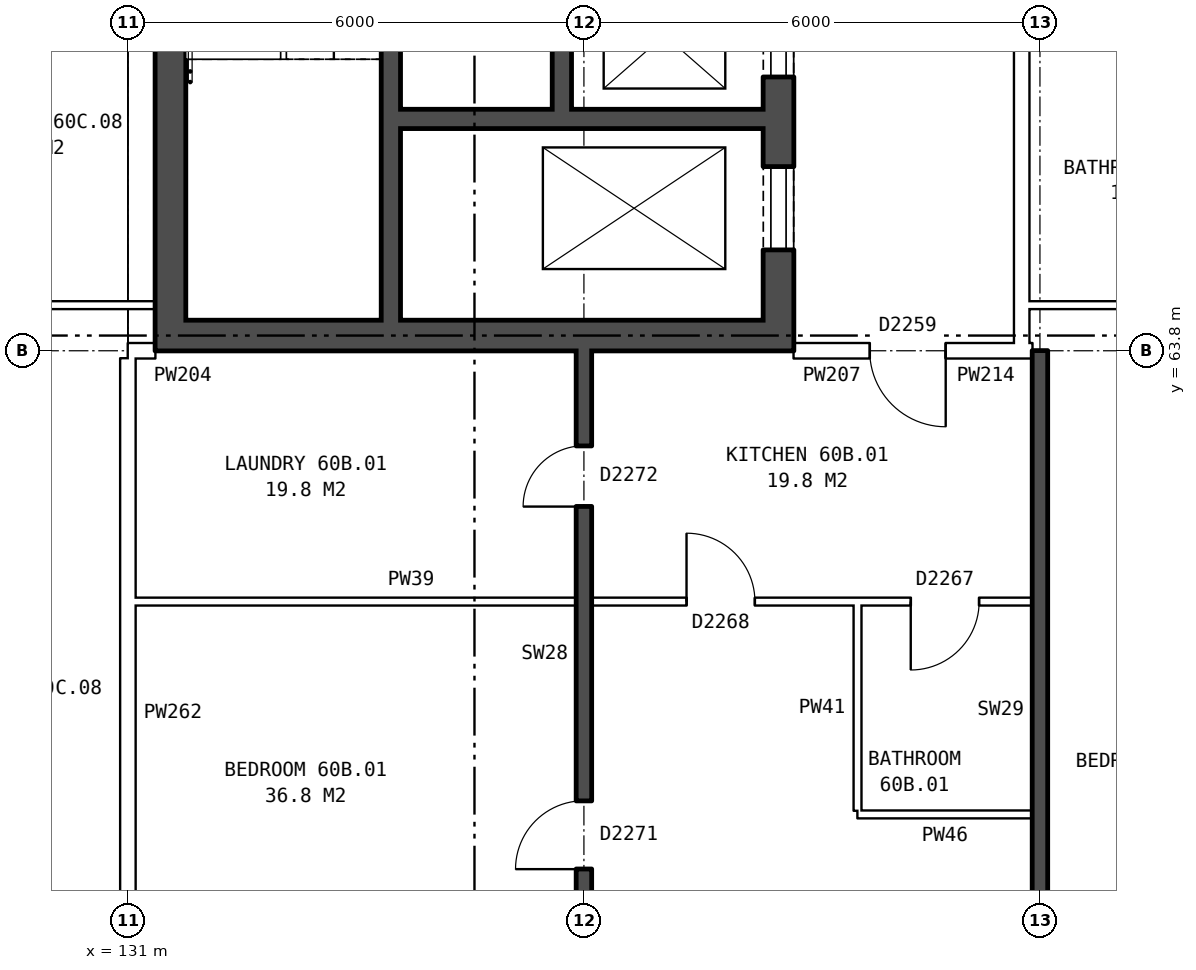
"""IFC4 building model, lengths in metres.
Left out: names, types, materials, properties, quantities, classifications, styles, units other than length and angle.
Written with IfcOpenShell. Run it as: python <this file> out.ifc"""

import sys

from ifc_helpers import new_model, si_unit, direction, frame, frame_2d, origin, place, context, subcontext, project, spatial, rectangle, extrude, element, fill, save


model = new_model("IFC4")
c1 = context("Model", 3, precision=1e-05, world=origin(), true_north=direction((0.0, 1.0)))
c2 = subcontext(c1, "Body", "Model", "MODEL_VIEW")
j1 = project(units=[si_unit("LENGTHUNIT", "METRE"), si_unit("PLANEANGLEUNIT", "RADIAN")], contexts=[c1])
p1 = place(None, origin())
s1 = spatial("IfcSite", under=j1, at=p1, CompositionType="ELEMENT")
p2 = place(p1, origin())
s2 = spatial("IfcBuilding", under=s1, at=p2, CompositionType="ELEMENT")
p3 = place(p2, frame((0.0, 0.0, 212.1)))
s3 = spatial("IfcBuildingStorey", under=s2, at=p3, CompositionType="ELEMENT", Elevation=212.1)
p4 = place(p3, frame((139.56, 63.8, 0.0), z_axis=(0.0, 0.0, 1.0), x_axis=(0.0, 1.0, 0.0)))
e1 = element("IfcWall", 1, at=p4, inside=s3, PredefinedType="SHEAR", context=c2, shape_type="SweptSolid", body=[
    extrude(rectangle(XDim=12.4, YDim=0.4, at=frame_2d((6.2, 0.0))), origin(), (0.0, 0.0, 1.0), 2.85),
])
p5 = place(p4, frame((1.325, 0.0, 0.0)))
e2 = element("IfcOpeningElement", 2, at=p5, cuts=e1, PredefinedType="OPENING", context=c2, shape_type="SweptSolid", body=[
    extrude(rectangle(XDim=1.1, YDim=2.1, at=frame_2d((0.55, 1.05))), frame((0.0, 0.21, 0.0), z_axis=(0.0, -1.0, 0.0), x_axis=(1.0, 0.0, 0.0)), (0.0, 0.0, 1.0), 0.42),
])
p6 = place(p4, frame((3.6, 0.0, 0.0)))
e3 = element("IfcOpeningElement", 3, at=p6, cuts=e1, PredefinedType="OPENING", context=c2, shape_type="SweptSolid", body=[
    extrude(rectangle(XDim=1.1, YDim=2.1, at=frame_2d((0.55, 1.05))), frame((0.0, 0.21, 0.0), z_axis=(0.0, -1.0, 0.0), x_axis=(1.0, 0.0, 0.0)), (0.0, 0.0, 1.0), 0.42),
])
p7 = place(p4, frame((5.8, 0.0, 0.0)))
e4 = element("IfcOpeningElement", 4, at=p7, cuts=e1, PredefinedType="OPENING", context=c2, shape_type="SweptSolid", body=[
    extrude(rectangle(XDim=1.1, YDim=2.1, at=frame_2d((0.55, 1.05))), frame((0.0, 0.21, 0.0), z_axis=(0.0, -1.0, 0.0), x_axis=(1.0, 0.0, 0.0)), (0.0, 0.0, 1.0), 0.42),
])
p8 = place(p4, frame((9.9, 0.0, 0.0)))
e5 = element("IfcOpeningElement", 5, at=p8, cuts=e1, PredefinedType="OPENING", context=c2, shape_type="SweptSolid", body=[
    extrude(rectangle(XDim=1.1, YDim=2.1, at=frame_2d((0.55, 1.05))), frame((0.0, 0.21, 0.0), z_axis=(0.0, -1.0, 0.0), x_axis=(1.0, 0.0, 0.0)), (0.0, 0.0, 1.0), 0.42),
])
p9 = place(p4, frame((8.125, 0.0, 0.0)))
e6 = element("IfcOpeningElement", 6, at=p9, cuts=e1, PredefinedType="OPENING", context=c2, shape_type="SweptSolid", body=[
    extrude(rectangle(XDim=0.85, YDim=2.1, at=frame_2d((0.425, 1.05))), frame((0.0, 0.21, 0.0), z_axis=(0.0, -1.0, 0.0), x_axis=(1.0, 0.0, 0.0)), (0.0, 0.0, 1.0), 0.42),
])
p10 = place(p3, frame((131.56, 63.8, 0.0), z_axis=(0.0, 0.0, 1.0), x_axis=(0.0, 1.0, 0.0)))
e7 = element("IfcWall", 7, at=p10, inside=s3, PredefinedType="SHEAR", context=c2, shape_type="SweptSolid", body=[
    extrude(rectangle(XDim=12.4, YDim=0.4, at=frame_2d((6.2, 0.0))), origin(), (0.0, 0.0, 1.0), 2.85),
])
p11 = place(p10, frame((9.8, 0.0, 0.0)))
e8 = element("IfcOpeningElement", 8, at=p11, cuts=e7, PredefinedType="OPENING", context=c2, shape_type="SweptSolid", body=[
    extrude(rectangle(XDim=1.1, YDim=2.1, at=frame_2d((0.55, 1.05))), frame((0.0, 0.21, 0.0), z_axis=(0.0, -1.0, 0.0), x_axis=(1.0, 0.0, 0.0)), (0.0, 0.0, 1.0), 0.42),
])
p12 = place(p3, frame((139.36, 64.0, 0.0), z_axis=(0.0, 0.0, 1.0), x_axis=(-1.0, 0.0, 0.0)))
e9 = element("IfcWall", 9, at=p12, inside=s3, PredefinedType="SHEAR", context=c2, shape_type="SweptSolid", body=[
    extrude(rectangle(XDim=7.6, YDim=0.4, at=frame_2d((3.8, 0.0))), origin(), (0.0, 0.0, 1.0), 2.85),
])
p13 = place(p3, frame((139.36, 66.85, 0.0), z_axis=(0.0, 0.0, 1.0), x_axis=(-1.0, 0.0, 0.0)))
e10 = element("IfcWall", 10, at=p13, inside=s3, PredefinedType="SHEAR", context=c2, shape_type="SweptSolid", body=[
    extrude(rectangle(XDim=4.775, YDim=0.25, at=frame_2d((2.388, 0.0))), origin(), (0.0, 0.0, 1.0), 2.85),
])
p14 = place(p3, frame((136.71, 66.975, 0.0), z_axis=(0.0, 0.0, 1.0), x_axis=(0.0, 1.0, 0.0)))
e11 = element("IfcWall", 11, at=p14, inside=s3, PredefinedType="SHEAR", context=c2, shape_type="SweptSolid", body=[
    extrude(rectangle(XDim=4.15, YDim=0.25, at=frame_2d((2.075, 0.0))), origin(), (0.0, 0.0, 1.0), 2.85),
])
p15 = place(p3, frame((134.46, 64.2, 0.0), z_axis=(0.0, 0.0, 1.0), x_axis=(0.0, 1.0, 0.0)))
e12 = element("IfcWall", 12, at=p15, inside=s3, PredefinedType="SHEAR", context=c2, shape_type="SweptSolid", body=[
    extrude(rectangle(XDim=6.925, YDim=0.25, at=frame_2d((3.462, 0.0))), origin(), (0.0, 0.0, 1.0), 2.85),
])
p16 = place(p3, frame((142.76, 63.9, 0.0), z_axis=(0.0, 0.0, 1.0), x_axis=(0.0, 1.0, 0.0)))
e13 = element("IfcWall", 13, at=p16, inside=s3, PredefinedType="PARTITIONING", context=c2, shape_type="SweptSolid", body=[
    extrude(rectangle(XDim=12.2, YDim=0.2, at=frame_2d((6.1, 0.0))), origin(), (0.0, 0.0, 1.0), 2.85),
])
p17 = place(p16, frame((5.1, 0.0, 0.0)))
e14 = element("IfcOpeningElement", 14, at=p17, cuts=e13, PredefinedType="OPENING", context=c2, shape_type="SweptSolid", body=[
    extrude(rectangle(XDim=2.0, YDim=2.1, at=frame_2d((1.0, 1.05))), frame((0.0, 0.11, 0.0), z_axis=(0.0, -1.0, 0.0), x_axis=(1.0, 0.0, 0.0)), (0.0, 0.0, 1.0), 0.22),
])
p18 = place(p3, frame((140.6, 57.7, 0.0), z_axis=(0.0, 0.0, 1.0), x_axis=(1.0, 0.0, 0.0)))
e15 = element("IfcWall", 15, at=p18, inside=s3, PredefinedType="PARTITIONING", context=c2, shape_type="SweptSolid", body=[
    extrude(rectangle(XDim=2.3, YDim=0.1, at=frame_2d((1.15, 0.0))), origin(), (0.0, 0.0, 1.0), 2.85),
])
p19 = place(p3, frame((131.1, 60.5, 0.0), z_axis=(0.0, 0.0, 1.0), x_axis=(1.0, 0.0, 0.0)))
e16 = element("IfcWall", 16, at=p19, inside=s3, PredefinedType="PARTITIONING", context=c2, shape_type="SweptSolid", body=[
    extrude(rectangle(XDim=11.8, YDim=0.1, at=frame_2d((5.9, 0.0))), origin(), (0.0, 0.0, 1.0), 2.85),
])
p20 = place(p19, frame((7.25, 0.0, 0.0)))
e17 = element("IfcOpeningElement", 17, at=p20, cuts=e16, PredefinedType="OPENING", context=c2, shape_type="SweptSolid", body=[
    extrude(rectangle(XDim=0.9, YDim=2.1, at=frame_2d((0.45, 1.05))), frame((0.0, 0.06, 0.0), z_axis=(0.0, -1.0, 0.0), x_axis=(1.0, 0.0, 0.0)), (0.0, 0.0, 1.0), 0.12),
])
p21 = place(p19, frame((10.2, 0.0, 0.0)))
e18 = element("IfcOpeningElement", 18, at=p21, cuts=e16, PredefinedType="OPENING", context=c2, shape_type="SweptSolid", body=[
    extrude(rectangle(XDim=0.9, YDim=2.1, at=frame_2d((0.45, 1.05))), frame((0.0, 0.06, 0.0), z_axis=(0.0, -1.0, 0.0), x_axis=(1.0, 0.0, 0.0)), (0.0, 0.0, 1.0), 0.12),
])
p22 = place(p3, frame((131.0, 63.8, 0.0), z_axis=(0.0, 0.0, 1.0), x_axis=(1.0, 0.0, 0.0)))
e19 = element("IfcWall", 19, at=p22, inside=s3, PredefinedType="PARTITIONING", context=c2, shape_type="SweptSolid", body=[
    extrude(rectangle(XDim=0.36, YDim=0.2, at=frame_2d((0.18, 0.0))), origin(), (0.0, 0.0, 1.0), 2.85),
])
p23 = place(p3, frame((139.76, 63.8, 0.0), z_axis=(0.0, 0.0, 1.0), x_axis=(1.0, 0.0, 0.0)))
e20 = element("IfcWall", 20, at=p23, inside=s3, PredefinedType="PARTITIONING", context=c2, shape_type="SweptSolid", body=[
    extrude(rectangle(XDim=3.0, YDim=0.2, at=frame_2d((1.5, 0.0))), origin(), (0.0, 0.0, 1.0), 2.85),
])
p24 = place(p23, frame((1.0, 0.0, 0.0)))
e21 = element("IfcOpeningElement", 21, at=p24, cuts=e20, PredefinedType="OPENING", context=c2, shape_type="SweptSolid", body=[
    extrude(rectangle(XDim=1.0, YDim=2.1, at=frame_2d((0.5, 1.05))), frame((0.0, 0.11, 0.0), z_axis=(0.0, -1.0, 0.0), x_axis=(1.0, 0.0, 0.0)), (0.0, 0.0, 1.0), 0.22),
])
p25 = place(p3, frame((142.76, 63.8, 0.0), z_axis=(0.0, 0.0, 1.0), x_axis=(1.0, 0.0, 0.0)))
e22 = element("IfcWall", 22, at=p25, inside=s3, PredefinedType="PARTITIONING", context=c2, shape_type="SweptSolid", body=[
    extrude(rectangle(XDim=0.14, YDim=0.2, at=frame_2d((0.07, 0.0))), origin(), (0.0, 0.0, 1.0), 2.85),
])
p26 = place(p3, frame((127.912, 64.4, 0.0), z_axis=(0.0, 0.0, 1.0), x_axis=(1.0, 0.0, 0.0)))
e23 = element("IfcWall", 23, at=p26, inside=s3, PredefinedType="PARTITIONING", context=c2, shape_type="SweptSolid", body=[
    extrude(rectangle(XDim=3.448, YDim=0.1, at=frame_2d((1.724, 0.0))), origin(), (0.0, 0.0, 1.0), 2.85),
])
p27 = place(p3, frame((142.76, 64.4, 0.0), z_axis=(0.0, 0.0, 1.0), x_axis=(1.0, 0.0, 0.0)))
e24 = element("IfcWall", 24, at=p27, inside=s3, PredefinedType="PARTITIONING", context=c2, shape_type="SweptSolid", body=[
    extrude(rectangle(XDim=3.24, YDim=0.1, at=frame_2d((1.62, 0.0))), origin(), (0.0, 0.0, 1.0), 2.85),
])
p28 = place(p3, frame((131.0, 54.36, 0.0), z_axis=(0.0, 0.0, 1.0), x_axis=(0.0, 1.0, 0.0)))
e25 = element("IfcWall", 25, at=p28, inside=s3, PredefinedType="PARTITIONING", context=c2, shape_type="SweptSolid", body=[
    extrude(rectangle(XDim=9.34, YDim=0.2, at=frame_2d((4.67, 0.0))), origin(), (0.0, 0.0, 1.0), 2.85),
])
p29 = place(p3, frame((137.0, 54.36, 0.0), z_axis=(0.0, 0.0, 1.0), x_axis=(0.0, 1.0, 0.0)))
e26 = element("IfcWall", 26, at=p29, inside=s3, PredefinedType="SOLIDWALL", context=c2, shape_type="SweptSolid", body=[
    extrude(rectangle(XDim=9.44, YDim=0.2, at=frame_2d((4.72, 0.0))), origin(), (0.0, 0.0, 1.0), 2.85),
])
p30 = place(p29, frame((2.62, 0.0, 0.0)))
e27 = element("IfcOpeningElement", 27, at=p30, cuts=e26, PredefinedType="OPENING", context=c2, shape_type="SweptSolid", body=[
    extrude(rectangle(XDim=0.9, YDim=2.1, at=frame_2d((0.45, 1.05))), frame((0.0, 0.11, 0.0), z_axis=(0.0, -1.0, 0.0), x_axis=(1.0, 0.0, 0.0)), (0.0, 0.0, 1.0), 0.22),
])
p31 = place(p29, frame((7.39, 0.0, 0.0)))
e28 = element("IfcOpeningElement", 28, at=p31, cuts=e26, PredefinedType="OPENING", context=c2, shape_type="SweptSolid", body=[
    extrude(rectangle(XDim=0.8, YDim=2.1, at=frame_2d((0.4, 1.05))), frame((0.0, 0.11, 0.0), z_axis=(0.0, -1.0, 0.0), x_axis=(1.0, 0.0, 0.0)), (0.0, 0.0, 1.0), 0.22),
])
p32 = place(p3, frame((140.6, 57.75, 0.0), z_axis=(0.0, 0.0, 1.0), x_axis=(0.0, 1.0, 0.0)))
e29 = element("IfcWall", 29, at=p32, inside=s3, PredefinedType="PARTITIONING", context=c2, shape_type="SweptSolid", body=[
    extrude(rectangle(XDim=2.7, YDim=0.1, at=frame_2d((1.35, 0.0))), origin(), (0.0, 0.0, 1.0), 2.85),
])
p33 = place(p3, frame((143.0, 54.36, 0.0), z_axis=(0.0, 0.0, 1.0), x_axis=(0.0, 1.0, 0.0)))
e30 = element("IfcWall", 30, at=p33, inside=s3, PredefinedType="SOLIDWALL", context=c2, shape_type="SweptSolid", body=[
    extrude(rectangle(XDim=9.44, YDim=0.2, at=frame_2d((4.72, 0.0))), origin(), (0.0, 0.0, 1.0), 2.85),
])
p34 = place(p5, origin())
e31 = element("IfcDoor", 31, at=p34, inside=s3, OperationType="DOUBLE_DOOR_SLIDING", PredefinedType="DOOR", context=c2, shape_type="SweptSolid", body=[
    extrude(rectangle(XDim=1.1, YDim=2.1, at=frame_2d((0.55, 1.05))), frame((0.0, 0.185, 0.0), z_axis=(0.0, -1.0, 0.0), x_axis=(1.0, 0.0, 0.0)), (0.0, 0.0, 1.0), 0.05),
])
fill(e2, e31)
p35 = place(p6, origin())
e32 = element("IfcDoor", 32, at=p35, inside=s3, OperationType="DOUBLE_DOOR_SLIDING", PredefinedType="DOOR", context=c2, shape_type="SweptSolid", body=[
    extrude(rectangle(XDim=1.1, YDim=2.1, at=frame_2d((0.55, 1.05))), frame((0.0, 0.185, 0.0), z_axis=(0.0, -1.0, 0.0), x_axis=(1.0, 0.0, 0.0)), (0.0, 0.0, 1.0), 0.05),
])
fill(e3, e32)
p36 = place(p30, origin())
e33 = element("IfcDoor", 33, at=p36, inside=s3, OperationType="SINGLE_SWING_LEFT", PredefinedType="DOOR", context=c2, shape_type="SweptSolid", body=[
    extrude(rectangle(XDim=0.9, YDim=2.1, at=frame_2d((0.45, 1.05))), frame((0.0, 0.025, 0.0), z_axis=(0.0, -1.0, 0.0), x_axis=(1.0, 0.0, 0.0)), (0.0, 0.0, 1.0), 0.05),
])
fill(e27, e33)
p37 = place(p24, frame((1.0, 0.0, 0.0), z_axis=(0.0, 0.0, 1.0), x_axis=(-1.0, 0.0, 0.0)))
e34 = element("IfcDoor", 34, at=p37, inside=s3, OperationType="SINGLE_SWING_LEFT", PredefinedType="DOOR", context=c2, shape_type="SweptSolid", body=[
    extrude(rectangle(XDim=1.0, YDim=2.1, at=frame_2d((0.5, 1.05))), frame((0.0, 0.025, 0.0), z_axis=(0.0, -1.0, 0.0), x_axis=(1.0, 0.0, 0.0)), (0.0, 0.0, 1.0), 0.05),
])
fill(e21, e34)
p38 = place(p20, origin())
e35 = element("IfcDoor", 35, at=p38, inside=s3, OperationType="SINGLE_SWING_LEFT", PredefinedType="DOOR", context=c2, shape_type="SweptSolid", body=[
    extrude(rectangle(XDim=0.9, YDim=2.1, at=frame_2d((0.45, 1.05))), frame((0.0, 0.025, 0.0), z_axis=(0.0, -1.0, 0.0), x_axis=(1.0, 0.0, 0.0)), (0.0, 0.0, 1.0), 0.05),
])
fill(e17, e35)
p39 = place(p31, origin())
e36 = element("IfcDoor", 36, at=p39, inside=s3, OperationType="SINGLE_SWING_LEFT", PredefinedType="DOOR", context=c2, shape_type="SweptSolid", body=[
    extrude(rectangle(XDim=0.8, YDim=2.1, at=frame_2d((0.4, 1.05))), frame((0.0, 0.025, 0.0), z_axis=(0.0, -1.0, 0.0), x_axis=(1.0, 0.0, 0.0)), (0.0, 0.0, 1.0), 0.05),
])
fill(e28, e36)
p40 = place(p21, frame((0.9, 0.0, 0.0), z_axis=(0.0, 0.0, 1.0), x_axis=(-1.0, 0.0, 0.0)))
e37 = element("IfcDoor", 37, at=p40, inside=s3, OperationType="SINGLE_SWING_RIGHT", PredefinedType="DOOR", context=c2, shape_type="SweptSolid", body=[
    extrude(rectangle(XDim=0.9, YDim=2.1, at=frame_2d((0.45, 1.05))), frame((0.0, 0.025, 0.0), z_axis=(0.0, -1.0, 0.0), x_axis=(1.0, 0.0, 0.0)), (0.0, 0.0, 1.0), 0.05),
])
fill(e18, e37)
save(model, sys.argv[1])
